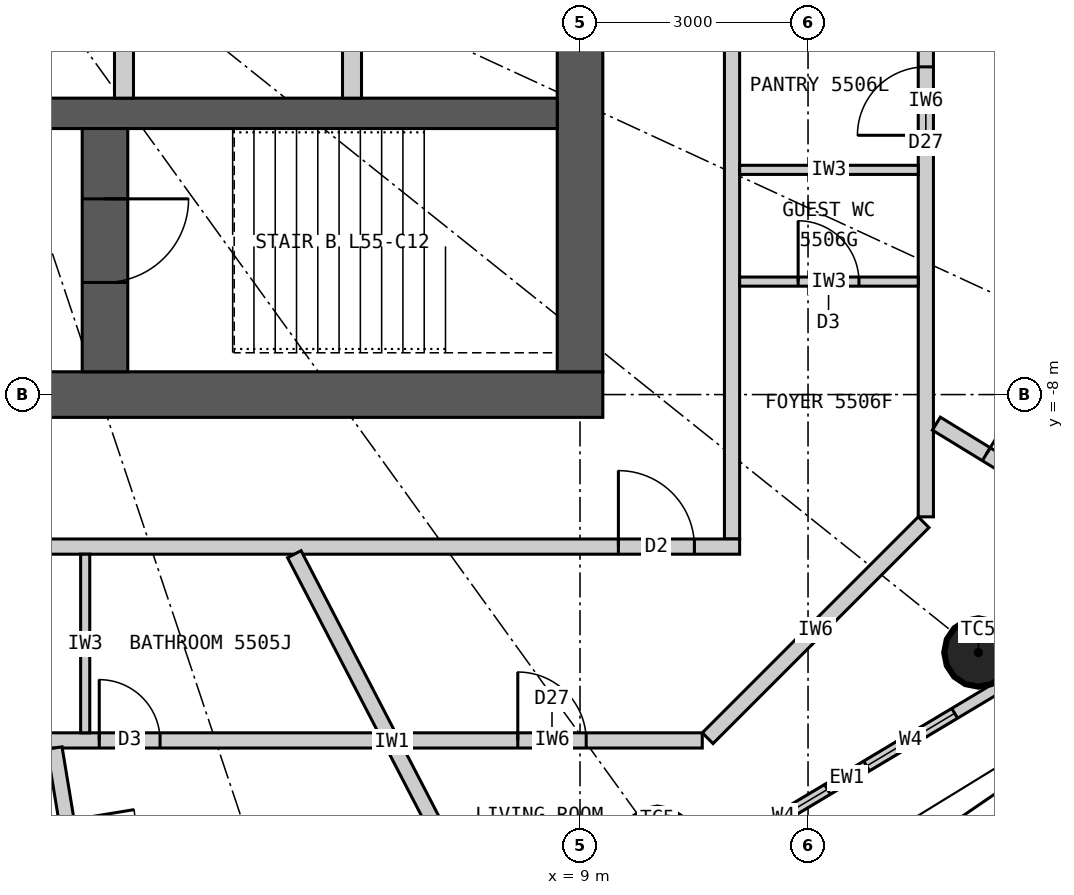
"""IFC4 building model, lengths in metres.
Left out: names, types, materials, properties, quantities, classifications, styles, units other than length and angle.
Written with IfcOpenShell. Run it as: python <this file> out.ifc"""

import sys

from ifc_helpers import new_model, si_unit, direction, frame, frame_2d, origin, origin_2d, place, context, subcontext, project, spatial, rectangle, circle, extrude, element, fill, save


model = new_model("IFC4")
c1 = context("Model", 3, precision=1e-05, world=origin(), true_north=direction((0.0, 1.0)))
c2 = subcontext(c1, "Body", "Model", "MODEL_VIEW")
j1 = project(units=[si_unit("LENGTHUNIT", "METRE"), si_unit("PLANEANGLEUNIT", "RADIAN")], contexts=[c1])
p1 = place(None, origin())
s1 = spatial("IfcSite", under=j1, at=p1, CompositionType="ELEMENT")
p2 = place(p1, origin())
s2 = spatial("IfcBuilding", under=s1, at=p2, CompositionType="ELEMENT")
p3 = place(p2, frame((0.0, 0.0, 206.1)))
s3 = spatial("IfcBuildingStorey", under=s2, at=p3, CompositionType="ELEMENT", Elevation=206.1)
for number, where, z_axis, x_axis in (
    (1, (10.019, -13.883, 0.0), (0.0, 0.0, 1.0), (1.0, 0.0, 0.0)),
    (2, (14.241, -11.393, 0.0), (0.0, 0.0, 1.0), (1.0, 0.0, 0.0)),
):
    element("IfcColumn", number, at=place(p3, frame(where, z_axis=z_axis, x_axis=x_axis)), inside=s3, PredefinedType="COLUMN", context=c2, shape_type="SweptSolid", body=[
        extrude(circle(Radius=0.45, at=origin_2d()), origin(), (0.0, 0.0, 1.0), 3.3),
    ])
p4 = place(p3, frame((9.3, -8.0, 0.0), z_axis=(0.0, 0.0, 1.0), x_axis=(-1.0, 0.0, 0.0)))
e3 = element("IfcWall", 3, at=p4, inside=s3, PredefinedType="SHEAR", context=c2, shape_type="SweptSolid", body=[
    extrude(rectangle(XDim=18.6, YDim=0.6, at=frame_2d((9.3, 0.0))), origin(), (0.0, 0.0, 1.0), 3.3),
])
p5 = place(p4, frame((8.0, 0.0, 0.0)))
e4 = element("IfcOpeningElement", 4, at=p5, cuts=e3, PredefinedType="OPENING", context=c2, shape_type="SweptSolid", body=[
    extrude(rectangle(XDim=1.2, YDim=2.2, at=frame_2d((0.6, 1.1))), frame((0.0, 0.31, 0.0), z_axis=(0.0, -1.0, 0.0), x_axis=(1.0, 0.0, 0.0)), (0.0, 0.0, 1.0), 0.62),
])
p6 = place(p4, frame((15.6, 0.0, 0.0)))
e5 = element("IfcOpeningElement", 5, at=p6, cuts=e3, PredefinedType="OPENING", context=c2, shape_type="SweptSolid", body=[
    extrude(rectangle(XDim=0.9, YDim=2.2, at=frame_2d((0.45, 1.1))), frame((0.0, 0.31, 0.0), z_axis=(0.0, -1.0, 0.0), x_axis=(1.0, 0.0, 0.0)), (0.0, 0.0, 1.0), 0.62),
])
p7 = place(p3, frame((9.0, -7.7, 0.0), z_axis=(0.0, 0.0, 1.0), x_axis=(0.0, 1.0, 0.0)))
e6 = element("IfcWall", 6, at=p7, inside=s3, PredefinedType="SHEAR", context=c2, shape_type="SweptSolid", body=[
    extrude(rectangle(XDim=15.4, YDim=0.6, at=frame_2d((7.7, 0.0))), origin(), (0.0, 0.0, 1.0), 3.3),
])
p8 = place(p7, frame((6.8, 0.0, 0.0)))
e7 = element("IfcOpeningElement", 7, at=p8, cuts=e6, PredefinedType="OPENING", context=c2, shape_type="SweptSolid", body=[
    extrude(rectangle(XDim=1.8, YDim=2.2, at=frame_2d((0.9, 1.1))), frame((0.0, 0.31, 0.0), z_axis=(0.0, -1.0, 0.0), x_axis=(1.0, 0.0, 0.0)), (0.0, 0.0, 1.0), 0.62),
])
p9 = place(p3, frame((-8.7, -4.3, 0.0), z_axis=(0.0, 0.0, 1.0), x_axis=(1.0, 0.0, 0.0)))
e8 = element("IfcWall", 8, at=p9, inside=s3, PredefinedType="SHEAR", context=c2, shape_type="SweptSolid", body=[
    extrude(rectangle(XDim=17.4, YDim=0.4, at=frame_2d((8.7, 0.0))), origin(), (0.0, 0.0, 1.0), 3.3),
])
p10 = place(p3, frame((2.75, -7.7, 0.0), z_axis=(0.0, 0.0, 1.0), x_axis=(0.0, 1.0, 0.0)))
e9 = element("IfcWall", 9, at=p10, inside=s3, PredefinedType="SHEAR", context=c2, shape_type="SweptSolid", body=[
    extrude(rectangle(XDim=3.2, YDim=0.6, at=frame_2d((1.6, 0.0))), origin(), (0.0, 0.0, 1.0), 3.3),
])
p11 = place(p10, frame((1.175, 0.0, 0.0)))
e10 = element("IfcOpeningElement", 10, at=p11, cuts=e9, PredefinedType="OPENING", context=c2, shape_type="SweptSolid", body=[
    extrude(rectangle(XDim=1.1, YDim=2.2, at=frame_2d((0.55, 1.1))), frame((0.0, 0.31, 0.0), z_axis=(0.0, -1.0, 0.0), x_axis=(1.0, 0.0, 0.0)), (0.0, 0.0, 1.0), 0.62),
])
for number, where, z_axis, x_axis in (
    (11, (3.0, -4.1, 0.0), (0.0, 0.0, 1.0), (0.0, 1.0, 0.0)),
    (12, (6.0, -4.1, 0.0), (0.0, 0.0, 1.0), (0.0, 1.0, 0.0)),
):
    element("IfcWall", number, at=place(p3, frame(where, z_axis=z_axis, x_axis=x_axis)), inside=s3, PredefinedType="PARTITIONING", context=c2, shape_type="SweptSolid", body=[
        extrude(rectangle(XDim=2.35, YDim=0.25, at=frame_2d((1.175, 0.0))), origin(), (0.0, 0.0, 1.0), 3.3),
    ])
p12 = place(p3, frame((10.346, -14.336, 0.0), z_axis=(0.0, 0.0, 1.0), x_axis=(0.85822150553, 0.513279502265, 0.0)))
e13 = element("IfcWall", 13, at=p12, inside=s3, PredefinedType="ELEMENTEDWALL", context=c2, shape_type="SweptSolid", body=[
    extrude(rectangle(XDim=5.05, YDim=0.15, at=frame_2d((2.525, 0.0))), origin(), (0.0, 0.0, 1.0), 3.12),
])
p13 = place(p12, frame((0.875, 0.0, 0.9)))
e14 = element("IfcOpeningElement", 14, at=p13, cuts=e13, PredefinedType="OPENING", context=c2, shape_type="SweptSolid", body=[
    extrude(rectangle(XDim=1.35, YDim=1.9, at=frame_2d((0.675, 0.95))), frame((0.0, 0.085, 0.0), z_axis=(0.0, -1.0, 0.0), x_axis=(1.0, 0.0, 0.0)), (0.0, 0.0, 1.0), 0.17),
])
p14 = place(p12, frame((2.825, 0.0, 0.9)))
e15 = element("IfcOpeningElement", 15, at=p14, cuts=e13, PredefinedType="OPENING", context=c2, shape_type="SweptSolid", body=[
    extrude(rectangle(XDim=1.35, YDim=1.9, at=frame_2d((0.675, 0.95))), frame((0.0, 0.085, 0.0), z_axis=(0.0, -1.0, 0.0), x_axis=(1.0, 0.0, 0.0)), (0.0, 0.0, 1.0), 0.17),
])
p15 = place(p3, frame((11.0, -9.9, 0.0), z_axis=(0.0, 0.0, 1.0), x_axis=(0.0, 1.0, 0.0)))
e16 = element("IfcWall", 16, at=p15, inside=s3, PredefinedType="PARTITIONING", context=c2, shape_type="SweptSolid", body=[
    extrude(rectangle(XDim=19.8, YDim=0.2, at=frame_2d((9.9, 0.0))), origin(), (0.0, 0.0, 1.0), 3.12),
])
p16 = place(p3, frame((11.1, -10.0, 0.0), z_axis=(0.0, 0.0, 1.0), x_axis=(-1.0, 0.0, 0.0)))
e17 = element("IfcWall", 17, at=p16, inside=s3, PredefinedType="PARTITIONING", context=c2, shape_type="SweptSolid", body=[
    extrude(rectangle(XDim=22.2, YDim=0.2, at=frame_2d((11.1, 0.0))), origin(), (0.0, 0.0, 1.0), 3.12),
])
p17 = place(p16, frame((11.36, 0.0, 0.0)))
e18 = element("IfcOpeningElement", 18, at=p17, cuts=e17, PredefinedType="OPENING", context=c2, shape_type="SweptSolid", body=[
    extrude(rectangle(XDim=1.0, YDim=2.2, at=frame_2d((0.5, 1.1))), frame((0.0, 0.11, 0.0), z_axis=(0.0, -1.0, 0.0), x_axis=(1.0, 0.0, 0.0)), (0.0, 0.0, 1.0), 0.22),
])
p18 = place(p16, frame((0.595, 0.0, 0.0)))
e19 = element("IfcOpeningElement", 19, at=p18, cuts=e17, PredefinedType="OPENING", context=c2, shape_type="SweptSolid", body=[
    extrude(rectangle(XDim=1.0, YDim=2.2, at=frame_2d((0.5, 1.1))), frame((0.0, 0.11, 0.0), z_axis=(0.0, -1.0, 0.0), x_axis=(1.0, 0.0, 0.0)), (0.0, 0.0, 1.0), 0.22),
])
p19 = place(p3, frame((5.241, -10.1, 0.0), z_axis=(0.0, 0.0, 1.0), x_axis=(0.460603196597, -0.887606160008, 0.0)))
e20 = element("IfcWall", 20, at=p19, inside=s3, PredefinedType="PARTITIONING", context=c2, shape_type="SweptSolid", body=[
    extrude(rectangle(XDim=5.58, YDim=0.2, at=frame_2d((2.79, 0.0))), origin(), (0.0, 0.0, 1.0), 3.12),
])
p20 = place(p3, frame((-4.082, -12.55, 0.0), z_axis=(0.0, 0.0, 1.0), x_axis=(1.0, 0.0, 0.0)))
e21 = element("IfcWall", 21, at=p20, inside=s3, PredefinedType="PARTITIONING", context=c2, shape_type="SweptSolid", body=[
    extrude(rectangle(XDim=10.446, YDim=0.2, at=frame_2d((5.223, 0.0))), origin(), (0.0, 0.0, 1.0), 3.12),
])
p21 = place(p20, frame((6.757, 0.0, 0.0)))
e22 = element("IfcOpeningElement", 22, at=p21, cuts=e21, PredefinedType="OPENING", context=c2, shape_type="SweptSolid", body=[
    extrude(rectangle(XDim=0.8, YDim=2.1, at=frame_2d((0.4, 1.05))), frame((0.0, 0.11, 0.0), z_axis=(0.0, -1.0, 0.0), x_axis=(1.0, 0.0, 0.0)), (0.0, 0.0, 1.0), 0.22),
])
p22 = place(p20, frame((3.372, 0.0, 0.0)))
e23 = element("IfcOpeningElement", 23, at=p22, cuts=e21, PredefinedType="OPENING", context=c2, shape_type="SweptSolid", body=[
    extrude(rectangle(XDim=0.9, YDim=2.1, at=frame_2d((0.45, 1.05))), frame((0.0, 0.11, 0.0), z_axis=(0.0, -1.0, 0.0), x_axis=(1.0, 0.0, 0.0)), (0.0, 0.0, 1.0), 0.22),
])
p23 = place(p3, frame((2.086, -12.65, 0.0), z_axis=(0.0, 0.0, 1.0), x_axis=(0.162664077359, -0.986681507852, 0.0)))
e24 = element("IfcWall", 24, at=p23, inside=s3, PredefinedType="PARTITIONING", context=c2, shape_type="SweptSolid", body=[
    extrude(rectangle(XDim=3.538, YDim=0.2, at=frame_2d((1.769, 0.0))), origin(), (0.0, 0.0, 1.0), 3.12),
])
p24 = place(p23, frame((0.97, 0.0, 0.0)))
e25 = element("IfcOpeningElement", 25, at=p24, cuts=e24, PredefinedType="OPENING", context=c2, shape_type="SweptSolid", body=[
    extrude(rectangle(XDim=0.9, YDim=2.1, at=frame_2d((0.45, 1.05))), frame((0.0, 0.11, 0.0), z_axis=(0.0, -1.0, 0.0), x_axis=(1.0, 0.0, 0.0)), (0.0, 0.0, 1.0), 0.22),
])
p25 = place(p3, frame((2.49, -10.1, 0.0), z_axis=(0.0, 0.0, 1.0), x_axis=(0.0, -1.0, 0.0)))
e26 = element("IfcWall", 26, at=p25, inside=s3, PredefinedType="PARTITIONING", context=c2, shape_type="SweptSolid", body=[
    extrude(rectangle(XDim=2.35, YDim=0.12, at=frame_2d((1.175, 0.0))), origin(), (0.0, 0.0, 1.0), 3.12),
])
p26 = place(p3, frame((6.661, -12.55, 0.0), z_axis=(0.0, 0.0, 1.0), x_axis=(1.0, 0.0, 0.0)))
e27 = element("IfcWall", 27, at=p26, inside=s3, PredefinedType="PARTITIONING", context=c2, shape_type="SweptSolid", body=[
    extrude(rectangle(XDim=3.947, YDim=0.2, at=frame_2d((1.974, 0.0))), origin(), (0.0, 0.0, 1.0), 3.12),
])
p27 = place(p26, frame((1.52, 0.0, 0.0)))
e28 = element("IfcOpeningElement", 28, at=p27, cuts=e27, PredefinedType="OPENING", context=c2, shape_type="SweptSolid", body=[
    extrude(rectangle(XDim=0.9, YDim=2.1, at=frame_2d((0.45, 1.05))), frame((0.0, 0.11, 0.0), z_axis=(0.0, -1.0, 0.0), x_axis=(1.0, 0.0, 0.0)), (0.0, 0.0, 1.0), 0.22),
])
p28 = place(p3, frame((10.679, -12.521, 0.0), z_axis=(0.0, 0.0, 1.0), x_axis=(0.707106781187, 0.707106781187, 0.0)))
e29 = element("IfcWall", 29, at=p28, inside=s3, PredefinedType="PARTITIONING", context=c2, shape_type="SweptSolid", body=[
    extrude(rectangle(XDim=4.019, YDim=0.2, at=frame_2d((2.009, 0.0))), origin(), (0.0, 0.0, 1.0), 3.12),
])
p29 = place(p3, frame((13.55, -9.609, 0.0), z_axis=(0.0, 0.0, 1.0), x_axis=(0.0, 1.0, 0.0)))
e30 = element("IfcWall", 30, at=p29, inside=s3, PredefinedType="PARTITIONING", context=c2, shape_type="SweptSolid", body=[
    extrude(rectangle(XDim=10.93, YDim=0.2, at=frame_2d((5.465, 0.0))), origin(), (0.0, 0.0, 1.0), 3.12),
])
p30 = place(p29, frame((5.02, 0.0, 0.0)))
e31 = element("IfcOpeningElement", 31, at=p30, cuts=e30, PredefinedType="OPENING", context=c2, shape_type="SweptSolid", body=[
    extrude(rectangle(XDim=0.9, YDim=2.1, at=frame_2d((0.45, 1.05))), frame((0.0, 0.11, 0.0), z_axis=(0.0, -1.0, 0.0), x_axis=(1.0, 0.0, 0.0)), (0.0, 0.0, 1.0), 0.22),
])
p31 = place(p29, frame((6.877, 0.0, 0.0)))
e32 = element("IfcOpeningElement", 32, at=p31, cuts=e30, PredefinedType="OPENING", context=c2, shape_type="SweptSolid", body=[
    extrude(rectangle(XDim=0.9, YDim=2.1, at=frame_2d((0.45, 1.05))), frame((0.0, 0.11, 0.0), z_axis=(0.0, -1.0, 0.0), x_axis=(1.0, 0.0, 0.0)), (0.0, 0.0, 1.0), 0.22),
])
p32 = place(p29, frame((8.565, 0.0, 0.0)))
e33 = element("IfcOpeningElement", 33, at=p32, cuts=e30, PredefinedType="OPENING", context=c2, shape_type="SweptSolid", body=[
    extrude(rectangle(XDim=0.8, YDim=2.1, at=frame_2d((0.4, 1.05))), frame((0.0, 0.11, 0.0), z_axis=(0.0, -1.0, 0.0), x_axis=(1.0, 0.0, 0.0)), (0.0, 0.0, 1.0), 0.22),
])
p33 = place(p3, frame((13.688, -8.382, 0.0), z_axis=(0.0, 0.0, 1.0), x_axis=(0.852783459586, -0.522264656144, 0.0)))
e34 = element("IfcWall", 34, at=p33, inside=s3, PredefinedType="PARTITIONING", context=c2, shape_type="SweptSolid", body=[
    extrude(rectangle(XDim=3.042, YDim=0.2, at=frame_2d((1.521, 0.0))), origin(), (0.0, 0.0, 1.0), 3.12),
])
p34 = place(p33, frame((0.77, 0.0, 0.0)))
e35 = element("IfcOpeningElement", 35, at=p34, cuts=e34, PredefinedType="OPENING", context=c2, shape_type="SweptSolid", body=[
    extrude(rectangle(XDim=0.9, YDim=2.1, at=frame_2d((0.45, 1.05))), frame((0.0, 0.11, 0.0), z_axis=(0.0, -1.0, 0.0), x_axis=(1.0, 0.0, 0.0)), (0.0, 0.0, 1.0), 0.22),
])
p35 = place(p3, frame((13.655, -2.927, 0.0), z_axis=(0.0, 0.0, 1.0), x_axis=(0.977790419294, -0.209585056568, 0.0)))
e36 = element("IfcWall", 36, at=p35, inside=s3, PredefinedType="PARTITIONING", context=c2, shape_type="SweptSolid", body=[
    extrude(rectangle(XDim=5.66, YDim=0.2, at=frame_2d((2.83, 0.0))), origin(), (0.0, 0.0, 1.0), 2.42),
])
p36 = place(p35, frame((1.82, 0.0, 0.0)))
e37 = element("IfcOpeningElement", 37, at=p36, cuts=e36, PredefinedType="OPENING", context=c2, shape_type="SweptSolid", body=[
    extrude(rectangle(XDim=0.9, YDim=2.1, at=frame_2d((0.45, 1.05))), frame((0.0, 0.11, 0.0), z_axis=(0.0, -1.0, 0.0), x_axis=(1.0, 0.0, 0.0)), (0.0, 0.0, 1.0), 0.22),
])
p37 = place(p3, frame((11.1, -6.514, 0.0), z_axis=(0.0, 0.0, 1.0), x_axis=(1.0, 0.0, 0.0)))
e38 = element("IfcWall", 38, at=p37, inside=s3, PredefinedType="PARTITIONING", context=c2, shape_type="SweptSolid", body=[
    extrude(rectangle(XDim=2.35, YDim=0.12, at=frame_2d((1.175, 0.0))), origin(), (0.0, 0.0, 1.0), 3.12),
])
p38 = place(p37, frame((0.77, 0.0, 0.0)))
e39 = element("IfcOpeningElement", 39, at=p38, cuts=e38, PredefinedType="OPENING", context=c2, shape_type="SweptSolid", body=[
    extrude(rectangle(XDim=0.8, YDim=2.1, at=frame_2d((0.4, 1.05))), frame((0.0, 0.07, 0.0), z_axis=(0.0, -1.0, 0.0), x_axis=(1.0, 0.0, 0.0)), (0.0, 0.0, 1.0), 0.14),
])
p39 = place(p3, frame((11.1, -5.044, 0.0), z_axis=(0.0, 0.0, 1.0), x_axis=(1.0, 0.0, 0.0)))
e40 = element("IfcWall", 40, at=p39, inside=s3, PredefinedType="PARTITIONING", context=c2, shape_type="SweptSolid", body=[
    extrude(rectangle(XDim=2.35, YDim=0.12, at=frame_2d((1.175, 0.0))), origin(), (0.0, 0.0, 1.0), 3.12),
])
p40 = place(p13, origin())
e41 = element("IfcWindow", 41, at=p40, inside=s3, PartitioningType="SINGLE_PANEL", PredefinedType="WINDOW", context=c2, shape_type="SweptSolid", body=[
    extrude(rectangle(XDim=1.35, YDim=1.9, at=frame_2d((0.675, 0.95))), frame((0.0, 0.03, 0.0), z_axis=(0.0, -1.0, 0.0), x_axis=(1.0, 0.0, 0.0)), (0.0, 0.0, 1.0), 0.06),
])
fill(e14, e41)
p41 = place(p14, origin())
e42 = element("IfcWindow", 42, at=p41, inside=s3, PartitioningType="SINGLE_PANEL", PredefinedType="WINDOW", context=c2, shape_type="SweptSolid", body=[
    extrude(rectangle(XDim=1.35, YDim=1.9, at=frame_2d((0.675, 0.95))), frame((0.0, 0.03, 0.0), z_axis=(0.0, -1.0, 0.0), x_axis=(1.0, 0.0, 0.0)), (0.0, 0.0, 1.0), 0.06),
])
fill(e15, e42)
p42 = place(p21, origin())
e43 = element("IfcDoor", 43, at=p42, inside=s3, OperationType="SINGLE_SWING_LEFT", PredefinedType="DOOR", context=c2, shape_type="SweptSolid", body=[
    extrude(rectangle(XDim=0.8, YDim=2.1, at=frame_2d((0.4, 1.05))), frame((0.0, 0.025, 0.0), z_axis=(0.0, -1.0, 0.0), x_axis=(1.0, 0.0, 0.0)), (0.0, 0.0, 1.0), 0.05),
])
fill(e22, e43)
p43 = place(p18, origin())
e44 = element("IfcDoor", 44, at=p43, inside=s3, OperationType="SINGLE_SWING_RIGHT", PredefinedType="DOOR", context=c2, shape_type="SweptSolid", body=[
    extrude(rectangle(XDim=1.0, YDim=2.2, at=frame_2d((0.5, 1.1))), frame((0.0, 0.025, 0.0), z_axis=(0.0, -1.0, 0.0), x_axis=(1.0, 0.0, 0.0)), (0.0, 0.0, 1.0), 0.05),
])
fill(e19, e44)
p44 = place(p38, origin())
e45 = element("IfcDoor", 45, at=p44, inside=s3, OperationType="SINGLE_SWING_LEFT", PredefinedType="DOOR", context=c2, shape_type="SweptSolid", body=[
    extrude(rectangle(XDim=0.8, YDim=2.1, at=frame_2d((0.4, 1.05))), frame((0.0, 0.025, 0.0), z_axis=(0.0, -1.0, 0.0), x_axis=(1.0, 0.0, 0.0)), (0.0, 0.0, 1.0), 0.05),
])
fill(e39, e45)
p45 = place(p30, origin())
e46 = element("IfcDoor", 46, at=p45, inside=s3, OperationType="SINGLE_SWING_LEFT", PredefinedType="DOOR", context=c2, shape_type="SweptSolid", body=[
    extrude(rectangle(XDim=0.9, YDim=2.1, at=frame_2d((0.45, 1.05))), frame((0.0, 0.025, 0.0), z_axis=(0.0, -1.0, 0.0), x_axis=(1.0, 0.0, 0.0)), (0.0, 0.0, 1.0), 0.05),
])
fill(e31, e46)
p46 = place(p27, origin())
e47 = element("IfcDoor", 47, at=p46, inside=s3, OperationType="SINGLE_SWING_LEFT", PredefinedType="DOOR", context=c2, shape_type="SweptSolid", body=[
    extrude(rectangle(XDim=0.9, YDim=2.1, at=frame_2d((0.45, 1.05))), frame((0.0, 0.025, 0.0), z_axis=(0.0, -1.0, 0.0), x_axis=(1.0, 0.0, 0.0)), (0.0, 0.0, 1.0), 0.05),
])
fill(e28, e47)
p47 = place(p34, origin())
e48 = element("IfcDoor", 48, at=p47, inside=s3, OperationType="SINGLE_SWING_LEFT", PredefinedType="DOOR", context=c2, shape_type="SweptSolid", body=[
    extrude(rectangle(XDim=0.9, YDim=2.1, at=frame_2d((0.45, 1.05))), frame((0.0, 0.025, 0.0), z_axis=(0.0, -1.0, 0.0), x_axis=(1.0, 0.0, 0.0)), (0.0, 0.0, 1.0), 0.05),
])
fill(e35, e48)
p48 = place(p11, origin())
e49 = element("IfcDoor", 49, at=p48, inside=s3, OperationType="SINGLE_SWING_RIGHT", PredefinedType="DOOR", context=c2, shape_type="SweptSolid", body=[
    extrude(rectangle(XDim=1.1, YDim=2.2, at=frame_2d((0.55, 1.1))), frame((0.0, 0.025, 0.0), z_axis=(0.0, -1.0, 0.0), x_axis=(1.0, 0.0, 0.0)), (0.0, 0.0, 1.0), 0.05),
])
fill(e10, e49)
save(model, sys.argv[1])
